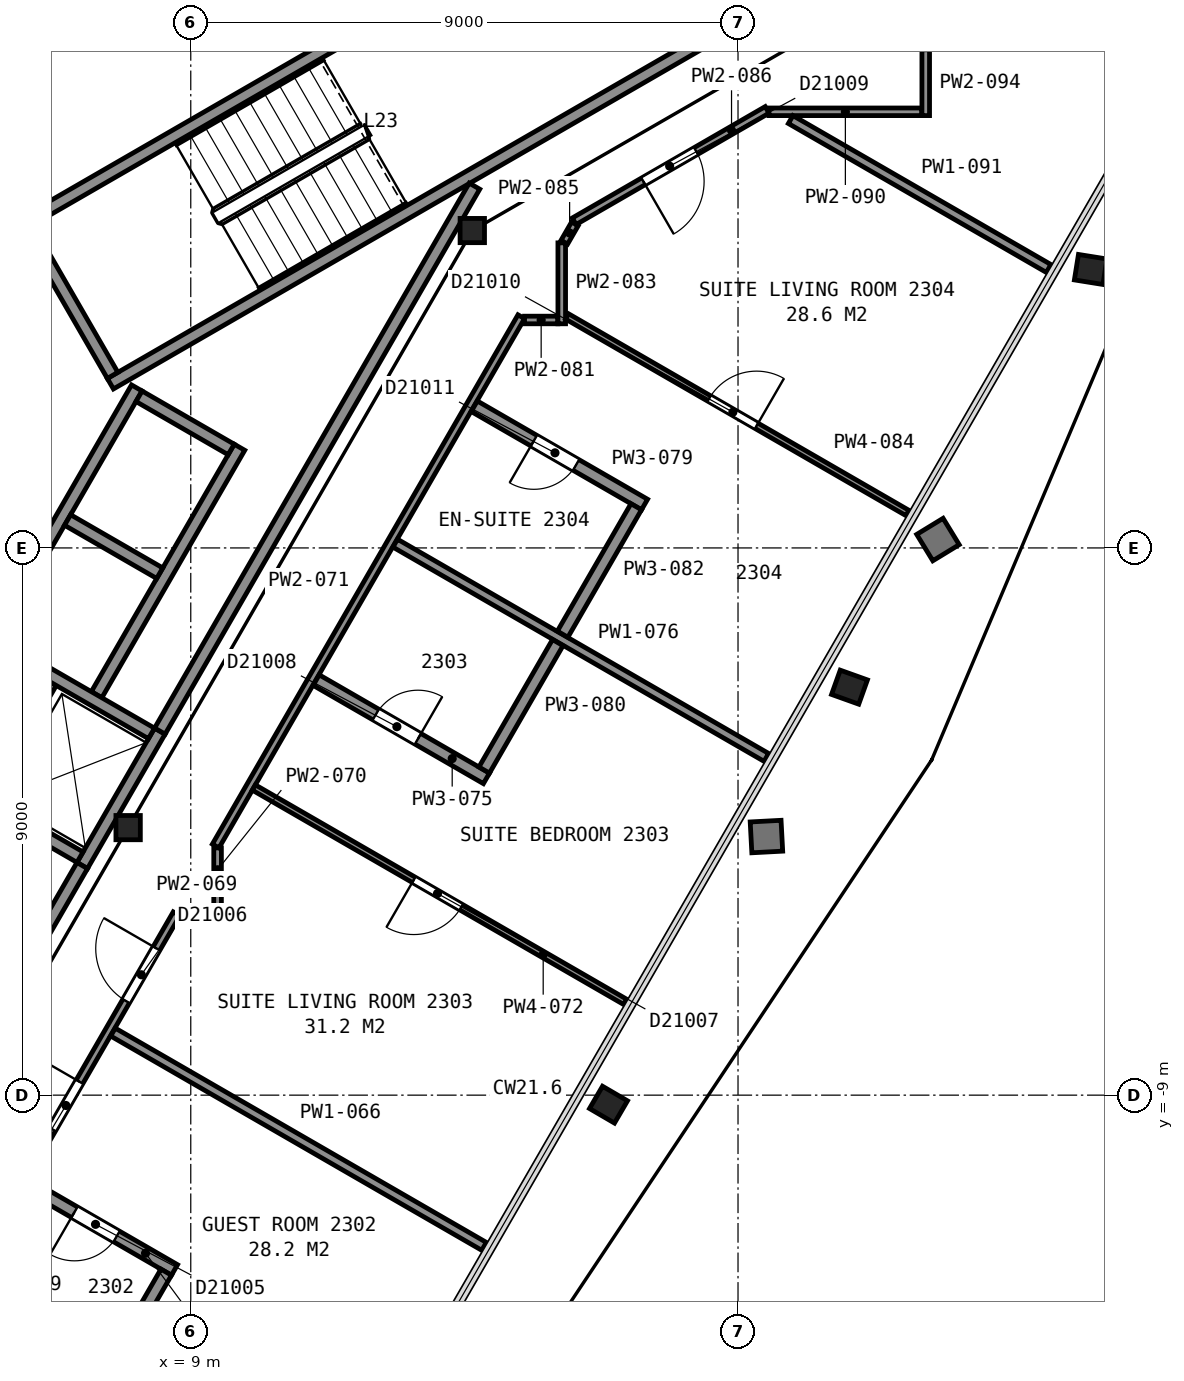
"""IFC4 building model, lengths in metres.
Left out: names, types, materials, properties, quantities, classifications, styles, units other than length and angle.
Written with IfcOpenShell. Run it as: python <this file> out.ifc"""

import sys

from ifc_helpers import new_model, si_unit, direction, frame, frame_2d, origin, origin_2d, place, context, subcontext, project, spatial, rectangle, i_section, extrude, element, fill, save


model = new_model("IFC4")
c1 = context("Model", 3, precision=1e-05, world=origin(), true_north=direction((0.0, 1.0)))
c2 = subcontext(c1, "Body", "Model", "MODEL_VIEW")
j1 = project(units=[si_unit("LENGTHUNIT", "METRE"), si_unit("PLANEANGLEUNIT", "RADIAN")], contexts=[c1])
p1 = place(None, origin())
s1 = spatial("IfcSite", under=j1, at=p1, CompositionType="ELEMENT")
p2 = place(p1, origin())
s2 = spatial("IfcBuilding", under=s1, at=p2, CompositionType="ELEMENT")
p3 = place(p2, frame((0.0, 0.0, 100.0)))
s3 = spatial("IfcBuildingStorey", under=s2, at=p3, CompositionType="ELEMENT", Elevation=100.0)
p4 = place(p3, frame((15.676, -9.043, 0.035), z_axis=(0.16365893308, -0.095479029009, 0.981885690212), x_axis=(-0.5000440218, -0.865999555519, -0.000863772219)))
e1 = element("IfcColumn", 1, at=p4, inside=s3, PredefinedType="COLUMN", context=c2, shape_type="SweptSolid", body=[
    extrude(i_section(OverallWidth=0.424, OverallDepth=0.475, WebThickness=0.048, FlangeThickness=0.077, FilletRadius=0.015, at=origin_2d()), origin(), (0.0, 0.0, 1.0), 3.595),
])
p5 = place(p3, frame((19.617, -2.213, 0.04), z_axis=(0.182620489527, -0.065386844425, 0.981006787632), x_axis=(-0.499563033841, -0.865557819508, 0.035304904861)))
e2 = element("IfcColumn", 2, at=p5, inside=s3, PredefinedType="COLUMN", context=c2, shape_type="SweptSolid", body=[
    extrude(i_section(OverallWidth=0.424, OverallDepth=0.475, WebThickness=0.048, FlangeThickness=0.077, FilletRadius=0.015, at=origin_2d()), origin(), (0.0, 0.0, 1.0), 3.588),
])
p6 = place(p3, frame((23.559, 4.618, 0.045), z_axis=(0.203832262206, -0.03259955045, 0.978462916106), x_axis=(-0.498534021373, -0.86361257453, 0.075080960618)))
e3 = element("IfcColumn", 3, at=p6, inside=s3, PredefinedType="COLUMN", context=c2, shape_type="SweptSolid", body=[
    extrude(i_section(OverallWidth=0.424, OverallDepth=0.475, WebThickness=0.048, FlangeThickness=0.077, FilletRadius=0.015, at=origin_2d()), origin(), (0.0, 0.0, 1.0), 3.587),
])
for number, where, z_axis, x_axis in (
    (4, (13.63, 5.22, 0.0), (0.0, 0.0, 1.0), (1.0, 0.0, 0.0)),
    (5, (7.97, -4.6, 0.0), (0.0, 0.0, 1.0), (1.0, 0.0, 0.0)),
):
    element("IfcColumn", number, at=place(p3, frame(where, z_axis=z_axis, x_axis=x_axis)), inside=s3, PredefinedType="COLUMN", context=c2, shape_type="SweptSolid", body=[
        extrude(i_section(OverallWidth=0.401, OverallDepth=0.399, WebThickness=0.025, FlangeThickness=0.04, FilletRadius=0.015, at=origin_2d()), origin(), (0.0, 0.0, 1.0), 3.6),
    ])
for number, where, z_axis, x_axis in (
    (6, (6.178, 5.299, 0.0), (0.0, 0.0, 1.0), (0.866, 0.5, 0.0)),
    (7, (7.678, 2.701, 0.0), (0.0, 0.0, 1.0), (0.866, 0.5, 0.0)),
):
    element("IfcWall", number, at=place(p3, frame(where, z_axis=z_axis, x_axis=x_axis)), inside=s3, PredefinedType="PARTITIONING", context=c2, shape_type="SweptSolid", body=[
        extrude(rectangle(XDim=12.0, YDim=0.2, at=frame_2d((6.0, 0.0))), origin(), (0.0, 0.0, 1.0), 3.35),
    ])
p7 = place(p3, frame((7.715, 2.838, 0.0), z_axis=(0.0, 0.0, 1.0), x_axis=(-0.500049511043, 0.865996816683, 0.0)))
e8 = element("IfcWall", 8, at=p7, inside=s3, PredefinedType="PARTITIONING", context=c2, shape_type="SweptSolid", body=[
    extrude(rectangle(XDim=2.8, YDim=0.2, at=frame_2d((1.4, 0.0))), origin(), (0.0, 0.0, 1.0), 3.35),
])
p8 = place(p3, frame((7.216, -5.222, 0.0), z_axis=(0.0, 0.0, 1.0), x_axis=(0.499990435942, 0.866030925526, 0.0)))
e9 = element("IfcWall", 9, at=p8, inside=s3, PredefinedType="PARTITIONING", context=c2, shape_type="SweptSolid", body=[
    extrude(rectangle(XDim=2.55, YDim=0.2, at=frame_2d((1.275, 0.0))), origin(), (0.0, 0.0, 1.0), 3.6),
])
p9 = place(p3, frame((7.451, -2.414, 0.0), z_axis=(0.0, 0.0, 1.0), x_axis=(0.500016218704, 0.866016039709, 0.0)))
e10 = element("IfcWall", 10, at=p9, inside=s3, PredefinedType="PARTITIONING", context=c2, shape_type="SweptSolid", body=[
    extrude(rectangle(XDim=4.7, YDim=0.2, at=frame_2d((2.35, 0.0))), origin(), (0.0, 0.0, 1.0), 3.6),
])
p10 = place(p3, frame((5.527, -4.247, 0.0), z_axis=(0.0, 0.0, 1.0), x_axis=(0.499938297808, 0.866061024631, 0.0)))
e11 = element("IfcWall", 11, at=p10, inside=s3, PredefinedType="PARTITIONING", context=c2, shape_type="SweptSolid", body=[
    extrude(rectangle(XDim=2.35, YDim=0.2, at=frame_2d((1.175, 0.0))), origin(), (0.0, 0.0, 1.0), 3.6),
])
p11 = place(p10, frame((0.725, 0.0, 0.0)))
e12 = element("IfcOpeningElement", 12, at=p11, cuts=e11, PredefinedType="OPENING", context=c2, shape_type="SweptSolid", body=[
    extrude(rectangle(XDim=1.1, YDim=2.1, at=frame_2d((0.55, 1.05))), frame((0.0, 0.11, 0.0), z_axis=(0.0, -1.0, 0.0), x_axis=(1.0, 0.0, 0.0)), (0.0, 0.0, 1.0), 0.22),
])
p12 = place(p3, frame((5.663, -1.612, 0.0), z_axis=(0.0, 0.0, 1.0), x_axis=(0.49998122708, 0.866036242063, 0.0)))
e13 = element("IfcWall", 13, at=p12, inside=s3, PredefinedType="PARTITIONING", context=c2, shape_type="SweptSolid", body=[
    extrude(rectangle(XDim=4.9, YDim=0.2, at=frame_2d((2.45, 0.0))), origin(), (0.0, 0.0, 1.0), 3.6),
])
p13 = place(p3, frame((9.665, 1.62, 0.0), z_axis=(0.0, 0.0, 1.0), x_axis=(-0.866002029911, 0.500040482552, 0.0)))
e14 = element("IfcWall", 14, at=p13, inside=s3, PredefinedType="PARTITIONING", context=c2, shape_type="SweptSolid", body=[
    extrude(rectangle(XDim=1.75, YDim=0.2, at=frame_2d((0.875, 0.0))), origin(), (0.0, 0.0, 1.0), 3.6),
])
p14 = place(p3, frame((8.49, -0.416, 0.0), z_axis=(0.0, 0.0, 1.0), x_axis=(-0.866036909293, 0.499980071345, 0.0)))
e15 = element("IfcWall", 15, at=p14, inside=s3, PredefinedType="PARTITIONING", context=c2, shape_type="SweptSolid", body=[
    extrude(rectangle(XDim=1.75, YDim=0.2, at=frame_2d((0.875, 0.0))), origin(), (0.0, 0.0, 1.0), 3.6),
])
p15 = place(p3, frame((8.354, -3.051, 0.0), z_axis=(0.0, 0.0, 1.0), x_axis=(-0.866060182126, 0.499939757307, 0.0)))
e16 = element("IfcWall", 16, at=p15, inside=s3, PredefinedType="PARTITIONING", context=c2, shape_type="SweptSolid", body=[
    extrude(rectangle(XDim=2.95, YDim=0.2, at=frame_2d((1.475, 0.0))), origin(), (0.0, 0.0, 1.0), 3.6),
])
p16 = place(p3, frame((7.179, -5.086, 0.0), z_axis=(0.0, 0.0, 1.0), x_axis=(-0.866036909293, 0.499980071345, 0.0)))
e17 = element("IfcWall", 17, at=p16, inside=s3, PredefinedType="PARTITIONING", context=c2, shape_type="SweptSolid", body=[
    extrude(rectangle(XDim=1.75, YDim=0.2, at=frame_2d((0.875, 0.0))), origin(), (0.0, 0.0, 1.0), 3.6),
])
p17 = place(p3, frame((5.906, -7.49, 0.0), z_axis=(0.0, 0.0, 1.0), x_axis=(0.500252727967, 0.865879442048, 0.0)))
e18 = element("IfcWall", 18, at=p17, inside=s3, PredefinedType="PARTITIONING", context=c2, shape_type="SweptSolid", body=[
    extrude(rectangle(XDim=2.617, YDim=0.2, at=frame_2d((1.309, 0.0))), origin(), (0.0, 0.0, 1.0), 3.35),
])
p18 = place(p3, frame((8.492, -3.012, 0.0), z_axis=(0.0, 0.0, 1.0), x_axis=(0.499972957231, 0.866041016371, 0.0)))
e19 = element("IfcWall", 19, at=p18, inside=s3, PredefinedType="PARTITIONING", context=c2, shape_type="SweptSolid", body=[
    extrude(rectangle(XDim=10.349, YDim=0.2, at=frame_2d((5.174, 0.0))), origin(), (0.0, 0.0, 1.0), 3.35),
])
p19 = place(p3, frame((8.766, -6.017, 0.0), z_axis=(0.0, 0.0, 1.0), x_axis=(-0.500051472265, -0.865995684219, 0.0)))
e20 = element("IfcWall", 20, at=p19, inside=s3, PredefinedType="PARTITIONING", context=c2, shape_type="SweptSolid", body=[
    extrude(rectangle(XDim=10.02, YDim=0.125, at=frame_2d((5.01, 0.0))), origin(), (0.0, 0.0, 1.0), 2.613),
])
p20 = place(p19, frame((3.19, 0.0, 0.0)))
e21 = element("IfcOpeningElement", 21, at=p20, cuts=e20, PredefinedType="OPENING", context=c2, shape_type="SweptSolid", body=[
    extrude(rectangle(XDim=0.9, YDim=2.1, at=frame_2d((0.45, 1.05))), frame((0.0, 0.073, 0.0), z_axis=(0.0, -1.0, 0.0), x_axis=(1.0, 0.0, 0.0)), (0.0, 0.0, 1.0), 0.145),
])
p21 = place(p19, frame((0.658, 0.0, 0.0)))
e22 = element("IfcOpeningElement", 22, at=p21, cuts=e20, PredefinedType="OPENING", context=c2, shape_type="SweptSolid", body=[
    extrude(rectangle(XDim=1.0, YDim=2.1, at=frame_2d((0.5, 1.05))), frame((0.0, 0.073, 0.0), z_axis=(0.0, -1.0, 0.0), x_axis=(1.0, 0.0, 0.0)), (0.0, 0.0, 1.0), 0.145),
])
p22 = place(p3, frame((5.175, -12.362, 0.0), z_axis=(0.0, 0.0, 1.0), x_axis=(0.866031654768, -0.499989172823, 0.0)))
e23 = element("IfcWall", 23, at=p22, inside=s3, PredefinedType="PARTITIONING", context=c2, shape_type="SweptSolid", body=[
    extrude(rectangle(XDim=7.052, YDim=0.15, at=frame_2d((3.526, 0.0))), origin(), (0.0, 0.0, 1.0), 2.613),
])
p23 = place(p3, frame((8.733, -11.875, 0.0), z_axis=(0.0, 0.0, 1.0), x_axis=(-0.866048046904, 0.499960778915, 0.0)))
e24 = element("IfcWall", 24, at=p23, inside=s3, PredefinedType="PARTITIONING", context=c2, shape_type="SweptSolid", body=[
    extrude(rectangle(XDim=2.838, YDim=0.2, at=frame_2d((1.419, 0.0))), origin(), (0.0, 0.0, 1.0), 2.613),
])
p24 = place(p23, frame((1.1, 0.0, 0.0)))
e25 = element("IfcOpeningElement", 25, at=p24, cuts=e24, PredefinedType="OPENING", context=c2, shape_type="SweptSolid", body=[
    extrude(rectangle(XDim=0.8, YDim=2.1, at=frame_2d((0.4, 1.05))), frame((0.0, 0.11, 0.0), z_axis=(0.0, -1.0, 0.0), x_axis=(1.0, 0.0, 0.0)), (0.0, 0.0, 1.0), 0.22),
])
p25 = place(p3, frame((7.583, -13.666, 0.0), z_axis=(0.0, 0.0, 1.0), x_axis=(0.49983374806, 0.866121368112, 0.0)))
e26 = element("IfcWall", 26, at=p25, inside=s3, PredefinedType="PARTITIONING", context=c2, shape_type="SweptSolid", body=[
    extrude(rectangle(XDim=2.026, YDim=0.2, at=frame_2d((1.013, 0.0))), origin(), (0.0, 0.0, 1.0), 2.613),
])
p26 = place(p3, frame((7.72, -7.963, 0.0), z_axis=(0.0, 0.0, 1.0), x_axis=(0.865980767462, -0.500077304409, 0.0)))
e27 = element("IfcWall", 27, at=p26, inside=s3, PredefinedType="PARTITIONING", context=c2, shape_type="SweptSolid", body=[
    extrude(rectangle(XDim=7.047, YDim=0.15, at=frame_2d((3.524, 0.0))), origin(), (0.0, 0.0, 1.0), 2.613),
])
p27 = place(p3, frame((8.82, -6.071, 0.0), z_axis=(0.0, 0.0, 1.0), x_axis=(1.0, 0.0, 0.0)))
e28 = element("IfcWall", 28, at=p27, inside=s3, PredefinedType="PARTITIONING", context=c2, shape_type="SweptSolid", body=[
    extrude(rectangle(XDim=0.556, YDim=0.125, at=frame_2d((0.278, 0.0))), origin(), (0.0, 0.0, 1.0), 2.613),
])
p28 = place(p3, frame((9.441, -6.134, 0.0), z_axis=(0.0, 0.0, 1.0), x_axis=(0.0, 1.0, 0.0)))
e29 = element("IfcWall", 29, at=p28, inside=s3, PredefinedType="PARTITIONING", context=c2, shape_type="SweptSolid", body=[
    extrude(rectangle(XDim=1.2, YDim=0.125, at=frame_2d((0.6, 0.0))), origin(), (0.0, 0.0, 1.0), 2.613),
])
p29 = place(p3, frame((9.41, -4.902, 0.0), z_axis=(0.0, 0.0, 1.0), x_axis=(0.499971244726, 0.866042005013, 0.0)))
e30 = element("IfcWall", 30, at=p29, inside=s3, PredefinedType="PARTITIONING", context=c2, shape_type="SweptSolid", body=[
    extrude(rectangle(XDim=10.052, YDim=0.125, at=frame_2d((5.026, 0.0))), origin(), (0.0, 0.0, 1.0), 2.613),
])
p30 = place(p3, frame((10.037, -3.94, 0.0), z_axis=(0.0, 0.0, 1.0), x_axis=(0.866063951978, -0.499933226626, 0.0)))
e31 = element("IfcWall", 31, at=p30, inside=s3, PredefinedType="PARTITIONING", context=c2, shape_type="SweptSolid", body=[
    extrude(rectangle(XDim=7.052, YDim=0.1, at=frame_2d((3.526, 0.0))), origin(), (0.0, 0.0, 1.0), 2.613),
])
p31 = place(p30, frame((3.038, 0.0, 0.0)))
e32 = element("IfcOpeningElement", 32, at=p31, cuts=e31, PredefinedType="OPENING", context=c2, shape_type="SweptSolid", body=[
    extrude(rectangle(XDim=0.9, YDim=2.1, at=frame_2d((0.45, 1.05))), frame((0.0, 0.06, 0.0), z_axis=(0.0, -1.0, 0.0), x_axis=(1.0, 0.0, 0.0)), (0.0, 0.0, 1.0), 0.12),
])
p32 = place(p3, frame((11.062, -2.174, 0.0), z_axis=(0.0, 0.0, 1.0), x_axis=(0.866078705744, -0.499907666931, 0.0)))
e33 = element("IfcWall", 33, at=p32, inside=s3, PredefinedType="PARTITIONING", context=c2, shape_type="SweptSolid", body=[
    extrude(rectangle(XDim=3.233, YDim=0.2, at=frame_2d((1.616, 0.0))), origin(), (0.0, 0.0, 1.0), 2.613),
])
p33 = place(p32, frame((1.133, 0.0, 0.0)))
e34 = element("IfcOpeningElement", 34, at=p33, cuts=e33, PredefinedType="OPENING", context=c2, shape_type="SweptSolid", body=[
    extrude(rectangle(XDim=0.8, YDim=2.1, at=frame_2d((0.4, 1.05))), frame((0.0, 0.11, 0.0), z_axis=(0.0, -1.0, 0.0), x_axis=(1.0, 0.0, 0.0)), (0.0, 0.0, 1.0), 0.22),
])
p34 = place(p3, frame((12.363, 0.078, 0.0), z_axis=(0.0, 0.0, 1.0), x_axis=(0.86605175433, -0.499954356739, 0.0)))
e35 = element("IfcWall", 35, at=p34, inside=s3, PredefinedType="PARTITIONING", context=c2, shape_type="SweptSolid", body=[
    extrude(rectangle(XDim=7.048, YDim=0.15, at=frame_2d((3.524, 0.0))), origin(), (0.0, 0.0, 1.0), 2.613),
])
p35 = place(p3, frame((16.463, 0.714, 0.0), z_axis=(0.0, 0.0, 1.0), x_axis=(-0.86609757561, 0.499874973892, 0.0)))
e36 = element("IfcWall", 36, at=p35, inside=s3, PredefinedType="PARTITIONING", context=c2, shape_type="SweptSolid", body=[
    extrude(rectangle(XDim=3.233, YDim=0.2, at=frame_2d((1.617, 0.0))), origin(), (0.0, 0.0, 1.0), 2.613),
])
p36 = place(p35, frame((1.301, 0.0, 0.0)))
e37 = element("IfcOpeningElement", 37, at=p36, cuts=e36, PredefinedType="OPENING", context=c2, shape_type="SweptSolid", body=[
    extrude(rectangle(XDim=0.8, YDim=2.1, at=frame_2d((0.4, 1.05))), frame((0.0, 0.11, 0.0), z_axis=(0.0, -1.0, 0.0), x_axis=(1.0, 0.0, 0.0)), (0.0, 0.0, 1.0), 0.22),
])
p37 = place(p3, frame((13.826, -3.653, 0.0), z_axis=(0.0, 0.0, 1.0), x_axis=(0.499719542643, 0.866187265377, 0.0)))
e38 = element("IfcWall", 38, at=p37, inside=s3, PredefinedType="PARTITIONING", context=c2, shape_type="SweptSolid", body=[
    extrude(rectangle(XDim=2.42, YDim=0.2, at=frame_2d((1.21, 0.0))), origin(), (0.0, 0.0, 1.0), 2.613),
])
p38 = place(p3, frame((14.489, 3.749, 0.0), z_axis=(0.0, 0.0, 1.0), x_axis=(1.0, 0.0, 0.0)))
e39 = element("IfcWall", 39, at=p38, inside=s3, PredefinedType="PARTITIONING", context=c2, shape_type="SweptSolid", body=[
    extrude(rectangle(XDim=0.547, YDim=0.125, at=frame_2d((0.273, 0.0))), origin(), (0.0, 0.0, 1.0), 2.613),
])
p39 = place(p3, frame((15.115, -1.419, 0.0), z_axis=(0.0, 0.0, 1.0), x_axis=(0.50002218001, 0.866012597771, 0.0)))
e40 = element("IfcWall", 40, at=p39, inside=s3, PredefinedType="PARTITIONING", context=c2, shape_type="SweptSolid", body=[
    extrude(rectangle(XDim=2.421, YDim=0.2, at=frame_2d((1.21, 0.0))), origin(), (0.0, 0.0, 1.0), 2.613),
])
p40 = place(p3, frame((15.101, 3.687, 0.0), z_axis=(0.0, 0.0, 1.0), x_axis=(0.0, 1.0, 0.0)))
e41 = element("IfcWall", 41, at=p40, inside=s3, PredefinedType="PARTITIONING", context=c2, shape_type="SweptSolid", body=[
    extrude(rectangle(XDim=1.331, YDim=0.125, at=frame_2d((0.666, 0.0))), origin(), (0.0, 0.0, 1.0), 2.613),
])
p41 = place(p3, frame((20.787, 0.575, 0.0), z_axis=(0.0, 0.0, 1.0), x_axis=(-0.866012632051, 0.500022120638, 0.0)))
e42 = element("IfcWall", 42, at=p41, inside=s3, PredefinedType="PARTITIONING", context=c2, shape_type="SweptSolid", body=[
    extrude(rectangle(XDim=6.465, YDim=0.1, at=frame_2d((3.232, 0.0))), origin(), (0.0, 0.0, 1.0), 2.613),
])
p42 = place(p41, frame((2.866, 0.0, 0.0)))
e43 = element("IfcOpeningElement", 43, at=p42, cuts=e42, PredefinedType="OPENING", context=c2, shape_type="SweptSolid", body=[
    extrude(rectangle(XDim=0.9, YDim=2.1, at=frame_2d((0.45, 1.05))), frame((0.0, 0.06, 0.0), z_axis=(0.0, -1.0, 0.0), x_axis=(1.0, 0.0, 0.0)), (0.0, 0.0, 1.0), 0.12),
])
p43 = place(p3, frame((15.144, 5.029, 0.0), z_axis=(0.0, 0.0, 1.0), x_axis=(0.499682006278, 0.86620891972, 0.0)))
e44 = element("IfcWall", 44, at=p43, inside=s3, PredefinedType="PARTITIONING", context=c2, shape_type="SweptSolid", body=[
    extrude(rectangle(XDim=0.348, YDim=0.125, at=frame_2d((0.174, 0.0))), origin(), (0.0, 0.0, 1.0), 2.613),
])
p44 = place(p3, frame((18.478, 7.204, 0.0), z_axis=(0.0, 0.0, 1.0), x_axis=(-0.866011320536, -0.500024392108, 0.0)))
e45 = element("IfcWall", 45, at=p44, inside=s3, PredefinedType="PARTITIONING", context=c2, shape_type="SweptSolid", body=[
    extrude(rectangle(XDim=3.663, YDim=0.125, at=frame_2d((1.832, 0.0))), origin(), (0.0, 0.0, 1.0), 2.613),
])
p45 = place(p44, frame((1.351, 0.0, 0.0)))
e46 = element("IfcOpeningElement", 46, at=p45, cuts=e45, PredefinedType="OPENING", context=c2, shape_type="SweptSolid", body=[
    extrude(rectangle(XDim=1.0, YDim=2.1, at=frame_2d((0.5, 1.05))), frame((0.0, 0.073, 0.0), z_axis=(0.0, -1.0, 0.0), x_axis=(1.0, 0.0, 0.0)), (0.0, 0.0, 1.0), 0.145),
])
p46 = place(p3, frame((18.509, 7.173, 0.0), z_axis=(0.0, 0.0, 1.0), x_axis=(1.0, 0.0, 0.0)))
e47 = element("IfcWall", 47, at=p46, inside=s3, PredefinedType="PARTITIONING", context=c2, shape_type="SweptSolid", body=[
    extrude(rectangle(XDim=2.513, YDim=0.125, at=frame_2d((1.256, 0.0))), origin(), (0.0, 0.0, 1.0), 2.613),
])
p47 = place(p3, frame((18.866, 7.046, 0.0), z_axis=(0.0, 0.0, 1.0), x_axis=(0.866042025588, -0.499971209087, 0.0)))
e48 = element("IfcWall", 48, at=p47, inside=s3, PredefinedType="PARTITIONING", context=c2, shape_type="SweptSolid", body=[
    extrude(rectangle(XDim=4.899, YDim=0.15, at=frame_2d((2.45, 0.0))), origin(), (0.0, 0.0, 1.0), 2.613),
])
p48 = place(p3, frame((21.087, 10.209, 0.0), z_axis=(0.0, 0.0, 1.0), x_axis=(0.0, -1.0, 0.0)))
e49 = element("IfcWall", 49, at=p48, inside=s3, PredefinedType="PARTITIONING", context=c2, shape_type="SweptSolid", body=[
    extrude(rectangle(XDim=3.099, YDim=0.125, at=frame_2d((1.549, 0.0))), origin(), (0.0, 0.0, 1.0), 2.613),
])
p49 = place(p48, frame((1.037, 0.0, 0.0)))
e50 = element("IfcOpeningElement", 50, at=p49, cuts=e49, PredefinedType="OPENING", context=c2, shape_type="SweptSolid", body=[
    extrude(rectangle(XDim=1.0, YDim=2.1, at=frame_2d((0.5, 1.05))), frame((0.0, 0.073, 0.0), z_axis=(0.0, -1.0, 0.0), x_axis=(1.0, 0.0, 0.0)), (0.0, 0.0, 1.0), 0.145),
])
p50 = place(p20, origin())
e51 = element("IfcDoor", 51, at=p50, inside=s3, OperationType="SINGLE_SWING_LEFT", PredefinedType="DOOR", context=c2, shape_type="SweptSolid", body=[
    extrude(rectangle(XDim=0.9, YDim=2.1, at=frame_2d((0.45, 1.05))), frame((0.0, 0.025, 0.0), z_axis=(0.0, -1.0, 0.0), x_axis=(1.0, 0.0, 0.0)), (0.0, 0.0, 1.0), 0.05),
])
fill(e21, e51)
p51 = place(p21, origin())
e52 = element("IfcDoor", 52, at=p51, inside=s3, OperationType="SINGLE_SWING_LEFT", PredefinedType="DOOR", context=c2, shape_type="SweptSolid", body=[
    extrude(rectangle(XDim=1.0, YDim=2.1, at=frame_2d((0.5, 1.05))), frame((0.0, 0.025, 0.0), z_axis=(0.0, -1.0, 0.0), x_axis=(1.0, 0.0, 0.0)), (0.0, 0.0, 1.0), 0.05),
])
fill(e22, e52)
p52 = place(p24, origin())
e53 = element("IfcDoor", 53, at=p52, inside=s3, OperationType="SINGLE_SWING_RIGHT", PredefinedType="DOOR", context=c2, shape_type="SweptSolid", body=[
    extrude(rectangle(XDim=0.8, YDim=2.1, at=frame_2d((0.4, 1.05))), frame((0.0, 0.025, 0.0), z_axis=(0.0, -1.0, 0.0), x_axis=(1.0, 0.0, 0.0)), (0.0, 0.0, 1.0), 0.05),
])
fill(e25, e53)
p53 = place(p31, origin())
e54 = element("IfcDoor", 54, at=p53, inside=s3, OperationType="SINGLE_SWING_LEFT", PredefinedType="DOOR", context=c2, shape_type="SweptSolid", body=[
    extrude(rectangle(XDim=0.9, YDim=2.1, at=frame_2d((0.45, 1.05))), frame((0.0, 0.025, 0.0), z_axis=(0.0, -1.0, 0.0), x_axis=(1.0, 0.0, 0.0)), (0.0, 0.0, 1.0), 0.05),
])
fill(e32, e54)
p54 = place(p33, origin())
e55 = element("IfcDoor", 55, at=p54, inside=s3, OperationType="SINGLE_SWING_RIGHT", PredefinedType="DOOR", context=c2, shape_type="SweptSolid", body=[
    extrude(rectangle(XDim=0.8, YDim=2.1, at=frame_2d((0.4, 1.05))), frame((0.0, 0.025, 0.0), z_axis=(0.0, -1.0, 0.0), x_axis=(1.0, 0.0, 0.0)), (0.0, 0.0, 1.0), 0.05),
])
fill(e34, e55)
p55 = place(p36, origin())
e56 = element("IfcDoor", 56, at=p55, inside=s3, OperationType="SINGLE_SWING_RIGHT", PredefinedType="DOOR", context=c2, shape_type="SweptSolid", body=[
    extrude(rectangle(XDim=0.8, YDim=2.1, at=frame_2d((0.4, 1.05))), frame((0.0, 0.025, 0.0), z_axis=(0.0, -1.0, 0.0), x_axis=(1.0, 0.0, 0.0)), (0.0, 0.0, 1.0), 0.05),
])
fill(e37, e56)
p56 = place(p42, origin())
e57 = element("IfcDoor", 57, at=p56, inside=s3, OperationType="SINGLE_SWING_LEFT", PredefinedType="DOOR", context=c2, shape_type="SweptSolid", body=[
    extrude(rectangle(XDim=0.9, YDim=2.1, at=frame_2d((0.45, 1.05))), frame((0.0, 0.025, 0.0), z_axis=(0.0, -1.0, 0.0), x_axis=(1.0, 0.0, 0.0)), (0.0, 0.0, 1.0), 0.05),
])
fill(e43, e57)
p57 = place(p45, origin())
e58 = element("IfcDoor", 58, at=p57, inside=s3, OperationType="SINGLE_SWING_RIGHT", PredefinedType="DOOR", context=c2, shape_type="SweptSolid", body=[
    extrude(rectangle(XDim=1.0, YDim=2.1, at=frame_2d((0.5, 1.05))), frame((0.0, 0.025, 0.0), z_axis=(0.0, -1.0, 0.0), x_axis=(1.0, 0.0, 0.0)), (0.0, 0.0, 1.0), 0.05),
])
fill(e46, e58)
save(model, sys.argv[1])
